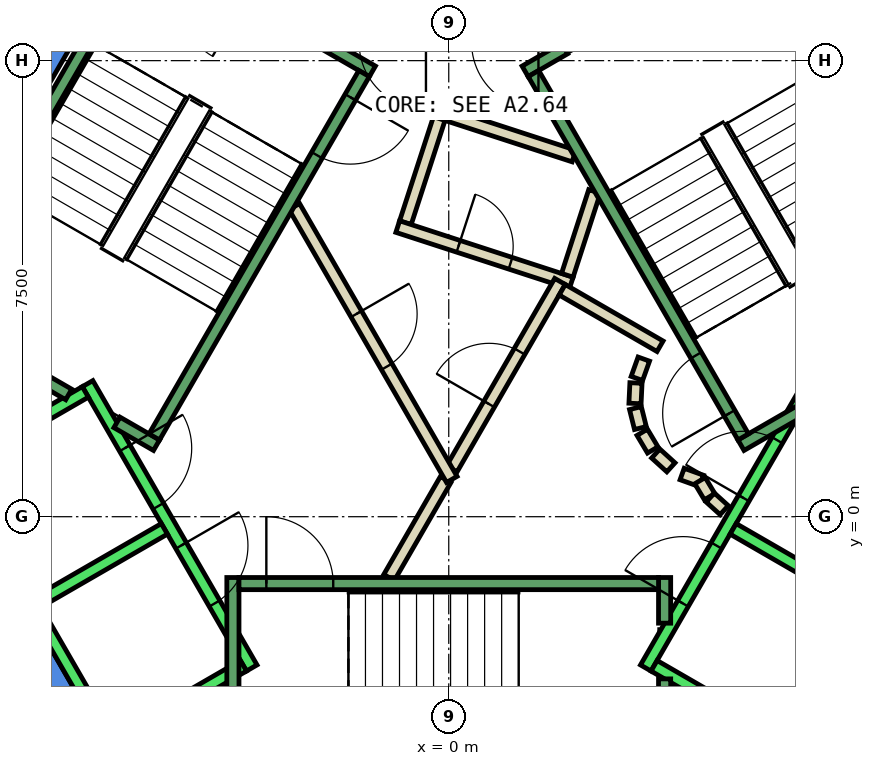
"""IFC4 building model, lengths in metres.
Left out: names, types, materials, properties, quantities, classifications, styles, units other than length and angle.
Written with IfcOpenShell. Run it as: python <this file> out.ifc"""

import sys

from ifc_helpers import new_model, si_unit, direction, frame, frame_2d, origin, place, context, subcontext, project, spatial, polyline, rectangle, outline, extrude, element, fill, save


model = new_model("IFC4")
c1 = context("Model", 3, precision=1e-05, world=origin(), true_north=direction((0.0, 1.0)))
c2 = subcontext(c1, "Body", "Model", "MODEL_VIEW")
j1 = project(units=[si_unit("LENGTHUNIT", "METRE"), si_unit("PLANEANGLEUNIT", "RADIAN")], contexts=[c1])
p1 = place(None, origin())
s1 = spatial("IfcSite", under=j1, at=p1, CompositionType="ELEMENT")
p2 = place(p1, origin())
s2 = spatial("IfcBuilding", under=s1, at=p2, CompositionType="ELEMENT")
p3 = place(p2, frame((0.0, 0.0, 304.4)))
s3 = spatial("IfcBuildingStorey", under=s2, at=p3, CompositionType="ELEMENT", Elevation=304.4)
p4 = place(p3, frame((0.0, 0.0, -0.34)))
e1 = element("IfcWall", 1, at=p4, inside=s3, PredefinedType="SHEAR", context=c2, shape_type="SweptSolid", body=[
    extrude(outline(polyline([(5.486, 9.998), (5.053, 9.748), (9.238, 2.5), (9.815, 2.5), (5.486, 9.998)])), origin(), (0.0, 0.0, 1.0), 3.6),
])
p5 = place(p3, frame((0.0, 0.0, -0.34)))
e2 = element("IfcWall", 2, at=p5, inside=s3, PredefinedType="SHEAR", context=c2, shape_type="SweptSolid", body=[
    extrude(outline(polyline([(-9.236, 3.502), (-8.803, 3.253), (-4.619, 10.5), (-4.907, 11.0), (-9.236, 3.502)])), origin(), (0.0, 0.0, 1.0), 3.6),
])
p6 = place(p3, frame((0.0, 0.0, -0.34)))
e3 = element("IfcWall", 3, at=p6, inside=s3, PredefinedType="SHEAR", context=c2, shape_type="SweptSolid", body=[
    extrude(outline(polyline([(-9.815, 2.5), (-4.907, -6.0), (-4.619, -5.5), (-9.238, 2.5), (-9.815, 2.5)])), origin(), (0.0, 0.0, 1.0), 3.6),
])
p7 = place(p3, frame((0.0, 0.0, -0.34)))
e4 = element("IfcWall", 4, at=p7, inside=s3, PredefinedType="SHEAR", context=c2, shape_type="SweptSolid", body=[
    extrude(outline(polyline([(4.907, -6.0), (9.815, 2.5), (9.238, 2.5), (4.619, -5.5), (4.907, -6.0)])), origin(), (0.0, 0.0, 1.0), 3.6),
])
p8 = place(p3, frame((2.06, 5.931, 0.0), z_axis=(0.0, 0.0, 1.0), x_axis=(-0.95092855133, 0.309410552932, 0.0)))
e5 = element("IfcWall", 5, at=p8, inside=s3, PredefinedType="PARTITIONING", context=c2, shape_type="SweptSolid", body=[
    extrude(rectangle(XDim=2.399, YDim=0.2, at=frame_2d((1.199, 0.0))), origin(), (0.0, 0.0, 1.0), 3.26),
])
p9 = place(p3, frame((-0.157, 6.547, 0.0), z_axis=(0.0, 0.0, 1.0), x_axis=(-0.308813127339, -0.951122732555, 0.0)))
e6 = element("IfcWall", 6, at=p9, inside=s3, PredefinedType="PARTITIONING", context=c2, shape_type="SweptSolid", body=[
    extrude(rectangle(XDim=1.8, YDim=0.2, at=frame_2d((0.9, 0.0))), origin(), (0.0, 0.0, 1.0), 3.26),
])
p10 = place(p3, frame((-0.839, 4.771, 0.0), z_axis=(0.0, 0.0, 1.0), x_axis=(0.950961084355, -0.309310549515, 0.0)))
e7 = element("IfcWall", 7, at=p10, inside=s3, PredefinedType="PARTITIONING", context=c2, shape_type="SweptSolid", body=[
    extrude(rectangle(XDim=3.0, YDim=0.2, at=frame_2d((1.5, 0.0))), origin(), (0.0, 0.0, 1.0), 3.26),
])
p11 = place(p10, frame((1.05, 0.0, 0.0)))
e8 = element("IfcOpeningElement", 8, at=p11, cuts=e7, PredefinedType="OPENING", context=c2, shape_type="SweptSolid", body=[
    extrude(rectangle(XDim=0.9, YDim=2.1, at=frame_2d((0.45, 1.05))), frame((0.0, 0.11, 0.0), z_axis=(0.0, -1.0, 0.0), x_axis=(1.0, 0.0, 0.0)), (0.0, 0.0, 1.0), 0.22),
])
p12 = place(p3, frame((1.95, 3.97, 0.0), z_axis=(0.0, 0.0, 1.0), x_axis=(0.308583003896, 0.951197418892, 0.0)))
e9 = element("IfcWall", 9, at=p12, inside=s3, PredefinedType="PARTITIONING", context=c2, shape_type="SweptSolid", body=[
    extrude(rectangle(XDim=1.449, YDim=0.2, at=frame_2d((0.724, 0.0))), origin(), (0.0, 0.0, 1.0), 3.26),
])
p13 = place(p3, frame((-0.982, -1.0, 0.0), z_axis=(0.0, 0.0, 1.0), x_axis=(0.50024047865, 0.865886518847, 0.0)))
e10 = element("IfcWall", 10, at=p13, inside=s3, PredefinedType="PARTITIONING", context=c2, shape_type="SweptSolid", body=[
    extrude(rectangle(XDim=1.863, YDim=0.2, at=frame_2d((0.931, 0.0))), origin(), (0.0, 0.0, 1.0), 3.26),
])
p14 = place(p3, frame((0.05, 0.787, 0.0), z_axis=(0.0, 0.0, 1.0), x_axis=(0.499954076797, 0.866051915934, 0.0)))
e11 = element("IfcWall", 11, at=p14, inside=s3, PredefinedType="PARTITIONING", context=c2, shape_type="SweptSolid", body=[
    extrude(rectangle(XDim=3.558, YDim=0.2, at=frame_2d((1.779, 0.0))), origin(), (0.0, 0.0, 1.0), 3.26),
])
p15 = place(p14, frame((1.229, 0.0, 0.0)))
e12 = element("IfcOpeningElement", 12, at=p15, cuts=e11, PredefinedType="OPENING", context=c2, shape_type="SweptSolid", body=[
    extrude(rectangle(XDim=1.0, YDim=2.1, at=frame_2d((0.5, 1.05))), frame((0.0, 0.11, 0.0), z_axis=(0.0, -1.0, 0.0), x_axis=(1.0, 0.0, 0.0)), (0.0, 0.0, 1.0), 0.22),
])
p16 = place(p3, frame((1.866, 3.732, 0.0), z_axis=(0.0, 0.0, 1.0), x_axis=(0.866043361281, -0.499968895414, 0.0)))
e13 = element("IfcWall", 13, at=p16, inside=s3, PredefinedType="PARTITIONING", context=c2, shape_type="SweptSolid", body=[
    extrude(rectangle(XDim=1.858, YDim=0.2, at=frame_2d((0.929, 0.0))), origin(), (0.0, 0.0, 1.0), 3.26),
])
p17 = place(p3, frame((3.208, 2.592, 0.0), z_axis=(0.0, 0.0, 1.0), x_axis=(-0.337388820924, -0.941365382578, 0.0)))
e14 = element("IfcWall", 14, at=p17, inside=s3, PredefinedType="PARTITIONING", context=c2, shape_type="SweptSolid", body=[
    extrude(rectangle(XDim=0.338, YDim=0.2, at=frame_2d((0.169, 0.0))), origin(), (0.0, 0.0, 1.0), 3.26),
])
p18 = place(p3, frame((3.079, 2.199, 0.0), z_axis=(0.0, 0.0, 1.0), x_axis=(-0.047771483479, -0.998858290933, 0.0)))
e15 = element("IfcWall", 15, at=p18, inside=s3, PredefinedType="PARTITIONING", context=c2, shape_type="SweptSolid", body=[
    extrude(rectangle(XDim=0.337, YDim=0.2, at=frame_2d((0.169, 0.0))), origin(), (0.0, 0.0, 1.0), 3.26),
])
p19 = place(p3, frame((3.07, 1.786, 0.0), z_axis=(0.0, 0.0, 1.0), x_axis=(0.242705583207, -0.970099994784, 0.0)))
e16 = element("IfcWall", 16, at=p19, inside=s3, PredefinedType="PARTITIONING", context=c2, shape_type="SweptSolid", body=[
    extrude(rectangle(XDim=0.338, YDim=0.2, at=frame_2d((0.169, 0.0))), origin(), (0.0, 0.0, 1.0), 3.26),
])
for number, where, z_axis, x_axis in (
    (17, (3.182, 1.388, 0.0), (0.0, 0.0, 1.0), (0.512, -0.859, 0.0)),
    (18, (3.404, 1.039, 0.0), (0.0, 0.0, 1.0), (0.74, -0.672, 0.0)),
):
    element("IfcWall", number, at=place(p3, frame(where, z_axis=z_axis, x_axis=x_axis)), inside=s3, PredefinedType="PARTITIONING", context=c2, shape_type="SweptSolid", body=[
        extrude(rectangle(XDim=0.338, YDim=0.2, at=frame_2d((0.169, 0.0))), origin(), (0.0, 0.0, 1.0), 3.26),
    ])
p20 = place(p3, frame((3.838, 0.702, 0.0), z_axis=(0.0, 0.0, 1.0), x_axis=(0.941035081519, -0.338308993895, 0.0)))
e19 = element("IfcWall", 19, at=p20, inside=s3, PredefinedType="PARTITIONING", context=c2, shape_type="SweptSolid", body=[
    extrude(rectangle(XDim=0.337, YDim=0.2, at=frame_2d((0.168, 0.0))), origin(), (0.0, 0.0, 1.0), 3.26),
])
p21 = place(p3, frame((4.132, 0.593, 0.0), z_axis=(0.0, 0.0, 1.0), x_axis=(0.513561617048, -0.858052717201, 0.0)))
e20 = element("IfcWall", 20, at=p21, inside=s3, PredefinedType="PARTITIONING", context=c2, shape_type="SweptSolid", body=[
    extrude(rectangle(XDim=0.308, YDim=0.2, at=frame_2d((0.154, 0.0))), origin(), (0.0, 0.0, 1.0), 3.26),
])
p22 = place(p3, frame((4.301, 0.315, 0.0), z_axis=(0.0, 0.0, 1.0), x_axis=(0.741798017506, -0.670623367639, 0.0)))
e21 = element("IfcWall", 21, at=p22, inside=s3, PredefinedType="PARTITIONING", context=c2, shape_type="SweptSolid", body=[
    extrude(rectangle(XDim=0.309, YDim=0.2, at=frame_2d((0.154, 0.0))), origin(), (0.0, 0.0, 1.0), 3.26),
])
p23 = place(p3, frame((-2.54, 5.1, 0.0), z_axis=(0.0, 0.0, 1.0), x_axis=(0.499925051871, -0.866068670783, 0.0)))
e22 = element("IfcWall", 22, at=p23, inside=s3, PredefinedType="PARTITIONING", context=c2, shape_type="SweptSolid", body=[
    extrude(rectangle(XDim=5.181, YDim=0.2, at=frame_2d((2.59, 0.0))), origin(), (0.0, 0.0, 1.0), 3.26),
])
p24 = place(p23, frame((2.04, 0.0, 0.0)))
e23 = element("IfcOpeningElement", 23, at=p24, cuts=e22, PredefinedType="OPENING", context=c2, shape_type="SweptSolid", body=[
    extrude(rectangle(XDim=1.0, YDim=2.1, at=frame_2d((0.5, 1.05))), frame((0.0, 0.11, 0.0), z_axis=(0.0, -1.0, 0.0), x_axis=(1.0, 0.0, 0.0)), (0.0, 0.0, 1.0), 0.22),
])
p25 = place(p3, frame((-5.94, 2.188, 0.0), z_axis=(0.0, 0.0, 1.0), x_axis=(0.500034260056, -0.866005622828, 0.0)))
e24 = element("IfcWall", 24, at=p25, inside=s3, PredefinedType="STANDARD", context=c2, shape_type="SweptSolid", body=[
    extrude(rectangle(XDim=5.399, YDim=0.2, at=frame_2d((2.7, 0.0))), origin(), (0.0, 0.0, 1.0), 3.26),
])
p26 = place(p25, frame((3.075, 0.0, 0.0)))
e25 = element("IfcOpeningElement", 25, at=p26, cuts=e24, PredefinedType="OPENING", context=c2, shape_type="SweptSolid", body=[
    extrude(rectangle(XDim=1.1, YDim=2.1, at=frame_2d((0.55, 1.05))), frame((0.0, 0.11, 0.0), z_axis=(0.0, -1.0, 0.0), x_axis=(1.0, 0.0, 0.0)), (0.0, 0.0, 1.0), 0.22),
])
p27 = place(p25, frame((1.225, 0.0, 0.0)))
e26 = element("IfcOpeningElement", 26, at=p27, cuts=e24, PredefinedType="OPENING", context=c2, shape_type="SweptSolid", body=[
    extrude(rectangle(XDim=1.1, YDim=2.1, at=frame_2d((0.55, 1.05))), frame((0.0, 0.11, 0.0), z_axis=(0.0, -1.0, 0.0), x_axis=(1.0, 0.0, 0.0)), (0.0, 0.0, 1.0), 0.22),
])
p28 = place(p3, frame((-8.192, 0.888, 0.0), z_axis=(0.0, 0.0, 1.0), x_axis=(0.500034260056, -0.866005622828, 0.0)))
e27 = element("IfcWall", 27, at=p28, inside=s3, PredefinedType="STANDARD", context=c2, shape_type="SweptSolid", body=[
    extrude(rectangle(XDim=5.399, YDim=0.2, at=frame_2d((2.7, 0.0))), origin(), (0.0, 0.0, 1.0), 3.26),
])
for number, where, z_axis, x_axis in (
    (28, (-5.977, 2.052, 0.0), (0.0, 0.0, 1.0), (-0.866, -0.5, 0.0)),
    (29, (-4.677, -0.2, 0.0), (0.0, 0.0, 1.0), (-0.866, -0.5, 0.0)),
):
    element("IfcWall", number, at=place(p3, frame(where, z_axis=z_axis, x_axis=x_axis)), inside=s3, PredefinedType="STANDARD", context=c2, shape_type="SweptSolid", body=[
        extrude(rectangle(XDim=2.399, YDim=0.2, at=frame_2d((1.2, 0.0))), origin(), (0.0, 0.0, 1.0), 3.26),
    ])
p29 = place(p3, frame((-3.377, -2.452, 0.0), z_axis=(0.0, 0.0, 1.0), x_axis=(-0.865955154139, -0.50012165622, 0.0)))
e30 = element("IfcWall", 30, at=p29, inside=s3, PredefinedType="STANDARD", context=c2, shape_type="SweptSolid", body=[
    extrude(rectangle(XDim=2.4, YDim=0.2, at=frame_2d((1.2, 0.0))), origin(), (0.0, 0.0, 1.0), 3.26),
])
p30 = place(p3, frame((3.24, -2.488, 0.0), z_axis=(0.0, 0.0, 1.0), x_axis=(0.500034260056, 0.866005622828, 0.0)))
e31 = element("IfcWall", 31, at=p30, inside=s3, PredefinedType="STANDARD", context=c2, shape_type="SweptSolid", body=[
    extrude(rectangle(XDim=5.399, YDim=0.2, at=frame_2d((2.7, 0.0))), origin(), (0.0, 0.0, 1.0), 3.26),
])
p31 = place(p30, frame((3.225, 0.0, 0.0)))
e32 = element("IfcOpeningElement", 32, at=p31, cuts=e31, PredefinedType="OPENING", context=c2, shape_type="SweptSolid", body=[
    extrude(rectangle(XDim=1.1, YDim=2.1, at=frame_2d((0.55, 1.05))), frame((0.0, 0.11, 0.0), z_axis=(0.0, -1.0, 0.0), x_axis=(1.0, 0.0, 0.0)), (0.0, 0.0, 1.0), 0.22),
])
p32 = place(p30, frame((1.225, 0.0, 0.0)))
e33 = element("IfcOpeningElement", 33, at=p32, cuts=e31, PredefinedType="OPENING", context=c2, shape_type="SweptSolid", body=[
    extrude(rectangle(XDim=1.1, YDim=2.1, at=frame_2d((0.55, 1.05))), frame((0.0, 0.11, 0.0), z_axis=(0.0, -1.0, 0.0), x_axis=(1.0, 0.0, 0.0)), (0.0, 0.0, 1.0), 0.22),
])
p33 = place(p3, frame((5.492, -3.788, 0.0), z_axis=(0.0, 0.0, 1.0), x_axis=(0.500034260056, 0.866005622828, 0.0)))
e34 = element("IfcWall", 34, at=p33, inside=s3, PredefinedType="STANDARD", context=c2, shape_type="SweptSolid", body=[
    extrude(rectangle(XDim=5.399, YDim=0.2, at=frame_2d((2.7, 0.0))), origin(), (0.0, 0.0, 1.0), 3.26),
])
p34 = place(p3, frame((3.377, -2.452, 0.0), z_axis=(0.0, 0.0, 1.0), x_axis=(0.865955154139, -0.50012165622, 0.0)))
e35 = element("IfcWall", 35, at=p34, inside=s3, PredefinedType="STANDARD", context=c2, shape_type="SweptSolid", body=[
    extrude(rectangle(XDim=2.4, YDim=0.2, at=frame_2d((1.2, 0.0))), origin(), (0.0, 0.0, 1.0), 3.26),
])
p35 = place(p3, frame((4.677, -0.2, 0.0), z_axis=(0.0, 0.0, 1.0), x_axis=(0.865973769406, -0.500089422704, 0.0)))
e36 = element("IfcWall", 36, at=p35, inside=s3, PredefinedType="STANDARD", context=c2, shape_type="SweptSolid", body=[
    extrude(rectangle(XDim=2.399, YDim=0.2, at=frame_2d((1.2, 0.0))), origin(), (0.0, 0.0, 1.0), 3.26),
])
p36 = place(p3, frame((-3.55, -1.0, 0.0), z_axis=(0.0, 0.0, 1.0), x_axis=(0.0, -1.0, 0.0)))
e37 = element("IfcWall", 37, at=p36, inside=s3, PredefinedType="STANDARD", context=c2, shape_type="SweptSolid", body=[
    extrude(rectangle(XDim=4.4, YDim=0.2, at=frame_2d((2.2, 0.0))), origin(), (0.0, 0.0, 1.0), 3.26),
])
p37 = place(p36, frame((2.4, 0.0, 0.0)))
e38 = element("IfcOpeningElement", 38, at=p37, cuts=e37, PredefinedType="OPENING", context=c2, shape_type="SweptSolid", body=[
    extrude(rectangle(XDim=1.1, YDim=2.2, at=frame_2d((0.55, 1.1))), frame((0.0, 0.11, 0.0), z_axis=(0.0, -1.0, 0.0), x_axis=(1.0, 0.0, 0.0)), (0.0, 0.0, 1.0), 0.22),
])
p38 = place(p3, frame((3.55, -2.667, 0.0), z_axis=(0.0, 0.0, 1.0), x_axis=(0.0, -1.0, 0.0)))
e39 = element("IfcWall", 39, at=p38, inside=s3, PredefinedType="STANDARD", context=c2, shape_type="SweptSolid", body=[
    extrude(rectangle(XDim=2.733, YDim=0.2, at=frame_2d((1.366, 0.0))), origin(), (0.0, 0.0, 1.0), 3.26),
])
p39 = place(p3, frame((3.55, -1.0, 0.0), z_axis=(0.0, 0.0, 1.0), x_axis=(0.0, -1.0, 0.0)))
e40 = element("IfcWall", 40, at=p39, inside=s3, PredefinedType="STANDARD", context=c2, shape_type="SweptSolid", body=[
    extrude(rectangle(XDim=0.751, YDim=0.2, at=frame_2d((0.375, 0.0))), origin(), (0.0, 0.0, 1.0), 3.26),
])
p40 = place(p3, frame((-3.45, -1.1, 0.0), z_axis=(0.0, 0.0, 1.0), x_axis=(1.0, 0.0, 0.0)))
e41 = element("IfcWall", 41, at=p40, inside=s3, PredefinedType="STANDARD", context=c2, shape_type="SweptSolid", body=[
    extrude(rectangle(XDim=6.9, YDim=0.2, at=frame_2d((3.45, 0.0))), origin(), (0.0, 0.0, 1.0), 3.26),
])
p41 = place(p40, frame((0.45, 0.0, 0.0)))
e42 = element("IfcOpeningElement", 42, at=p41, cuts=e41, PredefinedType="OPENING", context=c2, shape_type="SweptSolid", body=[
    extrude(rectangle(XDim=1.1, YDim=2.2, at=frame_2d((0.55, 1.1))), frame((0.0, 0.11, 0.0), z_axis=(0.0, -1.0, 0.0), x_axis=(1.0, 0.0, 0.0)), (0.0, 0.0, 1.0), 0.22),
])
p42 = place(p3, frame((4.806, 1.176, 0.0), z_axis=(0.0, 0.0, 1.0), x_axis=(0.866059941101, 0.499940174841, 0.0)))
e43 = element("IfcWall", 43, at=p42, inside=s3, PredefinedType="STANDARD", context=c2, shape_type="SweptSolid", body=[
    extrude(rectangle(XDim=4.4, YDim=0.2, at=frame_2d((2.2, 0.0))), origin(), (0.0, 0.0, 1.0), 3.26),
])
p43 = place(p42, frame((2.4, 0.0, 0.0)))
e44 = element("IfcOpeningElement", 44, at=p43, cuts=e43, PredefinedType="OPENING", context=c2, shape_type="SweptSolid", body=[
    extrude(rectangle(XDim=1.1, YDim=2.2, at=frame_2d((0.55, 1.1))), frame((0.0, 0.11, 0.0), z_axis=(0.0, -1.0, 0.0), x_axis=(1.0, 0.0, 0.0)), (0.0, 0.0, 1.0), 0.22),
])
p44 = place(p3, frame((1.256, 7.324, 0.0), z_axis=(0.0, 0.0, 1.0), x_axis=(0.865915093549, 0.500191014278, 0.0)))
e45 = element("IfcWall", 45, at=p44, inside=s3, PredefinedType="STANDARD", context=c2, shape_type="SweptSolid", body=[
    extrude(rectangle(XDim=0.752, YDim=0.2, at=frame_2d((0.376, 0.0))), origin(), (0.0, 0.0, 1.0), 3.26),
])
p45 = place(p3, frame((4.843, 1.312, 0.0), z_axis=(0.0, 0.0, 1.0), x_axis=(-0.499963383562, 0.866046543262, 0.0)))
e46 = element("IfcWall", 46, at=p45, inside=s3, PredefinedType="STANDARD", context=c2, shape_type="SweptSolid", body=[
    extrude(rectangle(XDim=6.9, YDim=0.2, at=frame_2d((3.45, 0.0))), origin(), (0.0, 0.0, 1.0), 3.26),
])
p46 = place(p45, frame((0.45, 0.0, 0.0)))
e47 = element("IfcOpeningElement", 47, at=p46, cuts=e46, PredefinedType="OPENING", context=c2, shape_type="SweptSolid", body=[
    extrude(rectangle(XDim=1.1, YDim=2.2, at=frame_2d((0.55, 1.1))), frame((0.0, 0.11, 0.0), z_axis=(0.0, -1.0, 0.0), x_axis=(1.0, 0.0, 0.0)), (0.0, 0.0, 1.0), 0.22),
])
p47 = place(p3, frame((8.48, 3.412, 0.0), z_axis=(0.0, 0.0, 1.0), x_axis=(-0.499978703459, 0.866037698999, 0.0)))
e48 = element("IfcWall", 48, at=p47, inside=s3, PredefinedType="STANDARD", context=c2, shape_type="SweptSolid", body=[
    extrude(rectangle(XDim=6.9, YDim=0.2, at=frame_2d((3.45, 0.0))), origin(), (0.0, 0.0, 1.0), 3.26),
])
p48 = place(p3, frame((-1.256, 7.324, 0.0), z_axis=(0.0, 0.0, 1.0), x_axis=(-0.866046073146, 0.499964197906, 0.0)))
e49 = element("IfcWall", 49, at=p48, inside=s3, PredefinedType="STANDARD", context=c2, shape_type="SweptSolid", body=[
    extrude(rectangle(XDim=4.4, YDim=0.2, at=frame_2d((2.2, 0.0))), origin(), (0.0, 0.0, 1.0), 3.26),
])
p49 = place(p48, frame((2.4, 0.0, 0.0)))
e50 = element("IfcOpeningElement", 50, at=p49, cuts=e49, PredefinedType="OPENING", context=c2, shape_type="SweptSolid", body=[
    extrude(rectangle(XDim=1.1, YDim=2.2, at=frame_2d((0.55, 1.1))), frame((0.0, 0.11, 0.0), z_axis=(0.0, -1.0, 0.0), x_axis=(1.0, 0.0, 0.0)), (0.0, 0.0, 1.0), 0.22),
])
p50 = place(p3, frame((-6.25, 2.01, 0.0), z_axis=(0.0, 0.0, 1.0), x_axis=(-0.86611865017, 0.499838457731, 0.0)))
e51 = element("IfcWall", 51, at=p50, inside=s3, PredefinedType="STANDARD", context=c2, shape_type="SweptSolid", body=[
    extrude(rectangle(XDim=2.733, YDim=0.2, at=frame_2d((1.366, 0.0))), origin(), (0.0, 0.0, 1.0), 3.26),
])
p51 = place(p3, frame((-4.806, 1.176, 0.0), z_axis=(0.0, 0.0, 1.0), x_axis=(-0.866558586415, 0.499075361355, 0.0)))
e52 = element("IfcWall", 52, at=p51, inside=s3, PredefinedType="STANDARD", context=c2, shape_type="SweptSolid", body=[
    extrude(rectangle(XDim=0.751, YDim=0.2, at=frame_2d((0.376, 0.0))), origin(), (0.0, 0.0, 1.0), 3.26),
])
p52 = place(p3, frame((-1.393, 7.288, 0.0), z_axis=(0.0, 0.0, 1.0), x_axis=(-0.499963383562, -0.866046543262, 0.0)))
e53 = element("IfcWall", 53, at=p52, inside=s3, PredefinedType="STANDARD", context=c2, shape_type="SweptSolid", body=[
    extrude(rectangle(XDim=6.9, YDim=0.2, at=frame_2d((3.45, 0.0))), origin(), (0.0, 0.0, 1.0), 3.26),
])
p53 = place(p52, frame((0.45, 0.0, 0.0)))
e54 = element("IfcOpeningElement", 54, at=p53, cuts=e53, PredefinedType="OPENING", context=c2, shape_type="SweptSolid", body=[
    extrude(rectangle(XDim=1.1, YDim=2.2, at=frame_2d((0.55, 1.1))), frame((0.0, 0.11, 0.0), z_axis=(0.0, -1.0, 0.0), x_axis=(1.0, 0.0, 0.0)), (0.0, 0.0, 1.0), 0.22),
])
p54 = place(p3, frame((-5.03, 9.388, 0.0), z_axis=(0.0, 0.0, 1.0), x_axis=(-0.499978703459, -0.866037698999, 0.0)))
e55 = element("IfcWall", 55, at=p54, inside=s3, PredefinedType="STANDARD", context=c2, shape_type="SweptSolid", body=[
    extrude(rectangle(XDim=6.9, YDim=0.2, at=frame_2d((3.45, 0.0))), origin(), (0.0, 0.0, 1.0), 3.26),
])
p55 = place(p15, origin())
e56 = element("IfcDoor", 56, at=p55, inside=s3, OperationType="SINGLE_SWING_RIGHT", PredefinedType="DOOR", context=c2, shape_type="SweptSolid", body=[
    extrude(rectangle(XDim=1.0, YDim=2.1, at=frame_2d((0.5, 1.05))), frame((0.0, 0.025, 0.0), z_axis=(0.0, -1.0, 0.0), x_axis=(1.0, 0.0, 0.0)), (0.0, 0.0, 1.0), 0.05),
])
fill(e12, e56)
p56 = place(p24, origin())
e57 = element("IfcDoor", 57, at=p56, inside=s3, OperationType="SINGLE_SWING_RIGHT", PredefinedType="DOOR", context=c2, shape_type="SweptSolid", body=[
    extrude(rectangle(XDim=1.0, YDim=2.1, at=frame_2d((0.5, 1.05))), frame((0.0, 0.025, 0.0), z_axis=(0.0, -1.0, 0.0), x_axis=(1.0, 0.0, 0.0)), (0.0, 0.0, 1.0), 0.05),
])
fill(e23, e57)
p57 = place(p11, origin())
e58 = element("IfcDoor", 58, at=p57, inside=s3, OperationType="SINGLE_SWING_LEFT", PredefinedType="DOOR", context=c2, shape_type="SweptSolid", body=[
    extrude(rectangle(XDim=0.9, YDim=2.1, at=frame_2d((0.45, 1.05))), frame((0.0, 0.025, 0.0), z_axis=(0.0, -1.0, 0.0), x_axis=(1.0, 0.0, 0.0)), (0.0, 0.0, 1.0), 0.05),
])
fill(e8, e58)
p58 = place(p31, origin())
e59 = element("IfcDoor", 59, at=p58, inside=s3, OperationType="SLIDING_TO_LEFT", PredefinedType="DOOR", context=c2, shape_type="SweptSolid", body=[
    extrude(rectangle(XDim=1.1, YDim=2.1, at=frame_2d((0.55, 1.05))), frame((0.0, 0.025, 0.0), z_axis=(0.0, -1.0, 0.0), x_axis=(1.0, 0.0, 0.0)), (0.0, 0.0, 1.0), 0.05),
])
fill(e32, e59)
p59 = place(p26, origin())
e60 = element("IfcDoor", 60, at=p59, inside=s3, OperationType="SLIDING_TO_LEFT", PredefinedType="DOOR", context=c2, shape_type="SweptSolid", body=[
    extrude(rectangle(XDim=1.1, YDim=2.1, at=frame_2d((0.55, 1.05))), frame((0.0, 0.025, 0.0), z_axis=(0.0, -1.0, 0.0), x_axis=(1.0, 0.0, 0.0)), (0.0, 0.0, 1.0), 0.05),
])
fill(e25, e60)
p60 = place(p32, origin())
e61 = element("IfcDoor", 61, at=p60, inside=s3, OperationType="SLIDING_TO_LEFT", PredefinedType="DOOR", context=c2, shape_type="SweptSolid", body=[
    extrude(rectangle(XDim=1.1, YDim=2.1, at=frame_2d((0.55, 1.05))), frame((0.0, 0.025, 0.0), z_axis=(0.0, -1.0, 0.0), x_axis=(1.0, 0.0, 0.0)), (0.0, 0.0, 1.0), 0.05),
])
fill(e33, e61)
p61 = place(p27, origin())
e62 = element("IfcDoor", 62, at=p61, inside=s3, OperationType="SLIDING_TO_LEFT", PredefinedType="DOOR", context=c2, shape_type="SweptSolid", body=[
    extrude(rectangle(XDim=1.1, YDim=2.1, at=frame_2d((0.55, 1.05))), frame((0.0, 0.025, 0.0), z_axis=(0.0, -1.0, 0.0), x_axis=(1.0, 0.0, 0.0)), (0.0, 0.0, 1.0), 0.05),
])
fill(e26, e62)
p62 = place(p41, origin())
e63 = element("IfcDoor", 63, at=p62, inside=s3, OperationType="SINGLE_SWING_LEFT", PredefinedType="DOOR", context=c2, shape_type="SweptSolid", body=[
    extrude(rectangle(XDim=1.1, YDim=2.2, at=frame_2d((0.55, 1.1))), frame((0.0, 0.025, 0.0), z_axis=(0.0, -1.0, 0.0), x_axis=(1.0, 0.0, 0.0)), (0.0, 0.0, 1.0), 0.05),
])
fill(e42, e63)
p63 = place(p46, origin())
e64 = element("IfcDoor", 64, at=p63, inside=s3, OperationType="SINGLE_SWING_LEFT", PredefinedType="DOOR", context=c2, shape_type="SweptSolid", body=[
    extrude(rectangle(XDim=1.1, YDim=2.2, at=frame_2d((0.55, 1.1))), frame((0.0, 0.025, 0.0), z_axis=(0.0, -1.0, 0.0), x_axis=(1.0, 0.0, 0.0)), (0.0, 0.0, 1.0), 0.05),
])
fill(e47, e64)
p64 = place(p53, origin())
e65 = element("IfcDoor", 65, at=p64, inside=s3, OperationType="SINGLE_SWING_LEFT", PredefinedType="DOOR", context=c2, shape_type="SweptSolid", body=[
    extrude(rectangle(XDim=1.1, YDim=2.2, at=frame_2d((0.55, 1.1))), frame((0.0, 0.025, 0.0), z_axis=(0.0, -1.0, 0.0), x_axis=(1.0, 0.0, 0.0)), (0.0, 0.0, 1.0), 0.05),
])
fill(e54, e65)
save(model, sys.argv[1])
